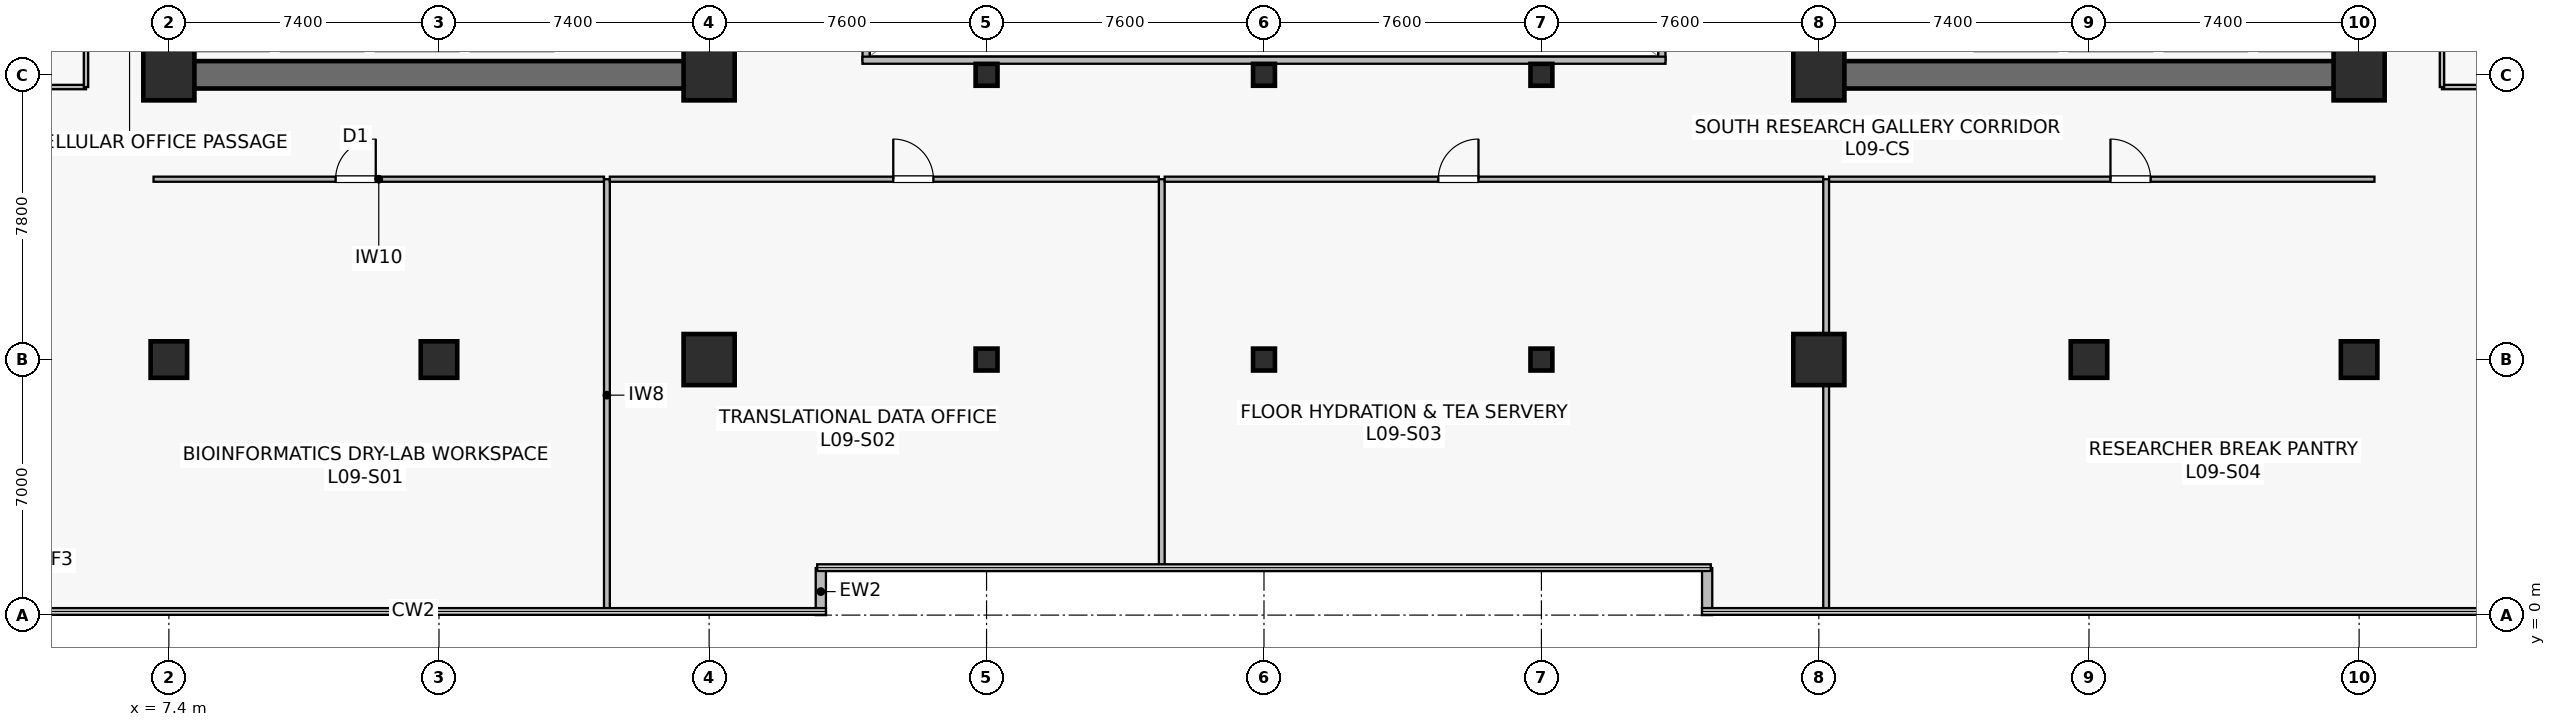
"""IFC4 building model, lengths in metres.
Left out: names, types, materials, properties, quantities, classifications, styles, units other than length and angle.
Written with IfcOpenShell. Run it as: python <this file> out.ifc"""

import sys

from ifc_helpers import new_model, si_unit, direction, frame, frame_2d, origin, origin_2d, place, context, subcontext, project, spatial, rectangle, hollow_rectangle, extrude, source, transform, mapped, element, fill, save


model = new_model("IFC4")
c1 = context("Model", 3, precision=1e-05, world=origin(), true_north=direction((0.0, 1.0)))
c2 = subcontext(c1, "Body", "Model", "MODEL_VIEW")
j1 = project(units=[si_unit("LENGTHUNIT", "METRE"), si_unit("PLANEANGLEUNIT", "RADIAN")], contexts=[c1])
p1 = place(None, origin())
s1 = spatial("IfcSite", under=j1, at=p1, CompositionType="ELEMENT")
p2 = place(p1, origin())
s2 = spatial("IfcBuilding", under=s1, at=p2, CompositionType="ELEMENT")
p3 = place(p2, frame((0.0, 0.0, 37.5)))
s3 = spatial("IfcBuildingStorey", under=s2, at=p3, CompositionType="ELEMENT", Elevation=37.5)
p4 = place(p3, frame((7.025, 14.8, 0.0), z_axis=(0.0, 0.0, 1.0), x_axis=(1.0, 0.0, 0.0)))
e1 = element("IfcWall", 1, at=p4, inside=s3, PredefinedType="SHEAR", context=c2, shape_type="SweptSolid", body=[
    extrude(rectangle(XDim=15.55, YDim=0.75, at=frame_2d((7.775, 0.0))), origin(), (0.0, 0.0, 1.0), 3.78),
])
p5 = place(p3, frame((7.4, 15.175, 0.0), z_axis=(0.0, 0.0, 1.0), x_axis=(0.0, 1.0, 0.0)))
e2 = element("IfcWall", 2, at=p5, inside=s3, PredefinedType="SHEAR", context=c2, shape_type="SweptSolid", body=[
    extrude(rectangle(XDim=18.25, YDim=0.75, at=frame_2d((9.125, 0.0))), origin(), (0.0, 0.0, 1.0), 3.78),
])
p6 = place(p3, frame((22.2, 15.175, 0.0), z_axis=(0.0, 0.0, 1.0), x_axis=(0.0, 1.0, 0.0)))
e3 = element("IfcWall", 3, at=p6, inside=s3, PredefinedType="SHEAR", context=c2, shape_type="SweptSolid", body=[
    extrude(rectangle(XDim=18.25, YDim=0.75, at=frame_2d((9.125, 0.0))), origin(), (0.0, 0.0, 1.0), 3.78),
])
p7 = place(p6, frame((3.375, 0.0, 0.0)))
e4 = element("IfcOpeningElement", 4, at=p7, cuts=e3, PredefinedType="OPENING", context=c2, shape_type="SweptSolid", body=[
    extrude(rectangle(XDim=1.42, YDim=2.2, at=frame_2d((0.71, 1.1))), frame((0.0, 0.385, 0.0), z_axis=(0.0, -1.0, 0.0), x_axis=(1.0, 0.0, 0.0)), (0.0, 0.0, 1.0), 0.77),
])
p8 = place(p3, frame((52.225, 14.8, 0.0), z_axis=(0.0, 0.0, 1.0), x_axis=(1.0, 0.0, 0.0)))
e5 = element("IfcWall", 5, at=p8, inside=s3, PredefinedType="SHEAR", context=c2, shape_type="SweptSolid", body=[
    extrude(rectangle(XDim=15.55, YDim=0.75, at=frame_2d((7.775, 0.0))), origin(), (0.0, 0.0, 1.0), 3.78),
])
p9 = place(p3, frame((52.6, 15.175, 0.0), z_axis=(0.0, 0.0, 1.0), x_axis=(0.0, 1.0, 0.0)))
e6 = element("IfcWall", 6, at=p9, inside=s3, PredefinedType="SHEAR", context=c2, shape_type="SweptSolid", body=[
    extrude(rectangle(XDim=18.25, YDim=0.75, at=frame_2d((9.125, 0.0))), origin(), (0.0, 0.0, 1.0), 3.78),
])
p10 = place(p9, frame((3.375, 0.0, 0.0)))
e7 = element("IfcOpeningElement", 7, at=p10, cuts=e6, PredefinedType="OPENING", context=c2, shape_type="SweptSolid", body=[
    extrude(rectangle(XDim=1.42, YDim=2.2, at=frame_2d((0.71, 1.1))), frame((0.0, 0.385, 0.0), z_axis=(0.0, -1.0, 0.0), x_axis=(1.0, 0.0, 0.0)), (0.0, 0.0, 1.0), 0.77),
])
p11 = place(p3, frame((67.4, 15.175, 0.0), z_axis=(0.0, 0.0, 1.0), x_axis=(0.0, 1.0, 0.0)))
e8 = element("IfcWall", 8, at=p11, inside=s3, PredefinedType="SHEAR", context=c2, shape_type="SweptSolid", body=[
    extrude(rectangle(XDim=18.25, YDim=0.75, at=frame_2d((9.125, 0.0))), origin(), (0.0, 0.0, 1.0), 3.78),
])
m1 = source(origin(), c2, "Body", "SweptSolid", [
    extrude(rectangle(XDim=1.0, YDim=1.0, at=origin_2d()), origin(), (0.0, 0.0, 1.0), 4.1),
])
p12 = place(p3, frame((14.8, 7.0, 0.0), z_axis=(0.0, 0.0, 1.0), x_axis=(1.0, 0.0, 0.0)))
e9 = element("IfcColumn", 9, at=p12, inside=s3, PredefinedType="COLUMN", context=c2, shape_type="MappedRepresentation", body=[
    mapped(m1, transform((0.0, 0.0, 0.0), scale=1.0)),
])
m2 = source(origin(), c2, "Body", "SweptSolid", [
    extrude(rectangle(XDim=1.4, YDim=1.4, at=origin_2d()), origin(), (0.0, 0.0, 1.0), 4.1),
])
for number, where, z_axis, x_axis in (
    (10, (22.2, 7.0, 0.0), (0.0, 0.0, 1.0), (1.0, 0.0, 0.0)),
    (11, (7.4, 14.8, 0.0), (0.0, 0.0, 1.0), (1.0, 0.0, 0.0)),
    (12, (22.2, 14.8, 0.0), (0.0, 0.0, 1.0), (1.0, 0.0, 0.0)),
    (13, (52.6, 7.0, 0.0), (0.0, 0.0, 1.0), (1.0, 0.0, 0.0)),
):
    element("IfcColumn", number, at=place(p3, frame(where, z_axis=z_axis, x_axis=x_axis)), inside=s3, PredefinedType="COLUMN", context=c2, shape_type="MappedRepresentation", body=[
        mapped(m2, transform((0.0, 0.0, 0.0), scale=1.0)),
    ])
p13 = place(p3, frame((60.0, 7.0, 0.0), z_axis=(0.0, 0.0, 1.0), x_axis=(1.0, 0.0, 0.0)))
e14 = element("IfcColumn", 14, at=p13, inside=s3, PredefinedType="COLUMN", context=c2, shape_type="MappedRepresentation", body=[
    mapped(m1, transform((0.0, 0.0, 0.0), scale=1.0)),
])
for number, where, z_axis, x_axis in (
    (15, (52.6, 14.8, 0.0), (0.0, 0.0, 1.0), (1.0, 0.0, 0.0)),
    (16, (67.4, 14.8, 0.0), (0.0, 0.0, 1.0), (1.0, 0.0, 0.0)),
):
    element("IfcColumn", number, at=place(p3, frame(where, z_axis=z_axis, x_axis=x_axis)), inside=s3, PredefinedType="COLUMN", context=c2, shape_type="MappedRepresentation", body=[
        mapped(m2, transform((0.0, 0.0, 0.0), scale=1.0)),
    ])
for number, where, z_axis, x_axis in (
    (17, (7.4, 7.0, 0.0), (0.0, 0.0, 1.0), (1.0, 0.0, 0.0)),
    (18, (67.4, 7.0, 0.0), (0.0, 0.0, 1.0), (1.0, 0.0, 0.0)),
):
    element("IfcColumn", number, at=place(p3, frame(where, z_axis=z_axis, x_axis=x_axis)), inside=s3, PredefinedType="COLUMN", context=c2, shape_type="MappedRepresentation", body=[
        mapped(m1, transform((0.0, 0.0, 0.0), scale=1.0)),
    ])
m3 = source(origin(), c2, "Body", "SweptSolid", [
    extrude(hollow_rectangle(XDim=0.6, YDim=0.6, WallThickness=0.028, at=origin_2d()), origin(), (0.0, 0.0, 1.0), 4.1),
])
for number, where, z_axis, x_axis in (
    (19, (29.8, 7.0, 0.0), (0.0, 0.0, 1.0), (1.0, 0.0, 0.0)),
    (20, (29.8, 14.8, 0.0), (0.0, 0.0, 1.0), (1.0, 0.0, 0.0)),
    (21, (37.4, 7.0, 0.0), (0.0, 0.0, 1.0), (1.0, 0.0, 0.0)),
    (22, (37.4, 14.8, 0.0), (0.0, 0.0, 1.0), (1.0, 0.0, 0.0)),
    (23, (45.0, 7.0, 0.0), (0.0, 0.0, 1.0), (1.0, 0.0, 0.0)),
    (24, (45.0, 14.8, 0.0), (0.0, 0.0, 1.0), (1.0, 0.0, 0.0)),
):
    element("IfcColumn", number, at=place(p3, frame(where, z_axis=z_axis, x_axis=x_axis)), inside=s3, PredefinedType="COLUMN", context=c2, shape_type="MappedRepresentation", body=[
        mapped(m3, transform((0.0, 0.0, 0.0), scale=1.0)),
    ])
for number, where, z_axis, x_axis in (
    (25, (25.26, 0.0, 0.0), (0.0, 0.0, 1.0), (0.0, 1.0, 0.0)),
    (26, (49.54, 1.288, 0.0), (0.0, 0.0, 1.0), (0.0, -1.0, 0.0)),
):
    element("IfcWall", number, at=place(p3, frame(where, z_axis=z_axis, x_axis=x_axis)), inside=s3, PredefinedType="STANDARD", context=c2, shape_type="SweptSolid", body=[
        extrude(rectangle(XDim=1.288, YDim=0.28, at=frame_2d((0.644, 0.0))), origin(), (0.0, 0.0, 1.0), 3.78),
    ])
p14 = place(p3, frame((26.5, 15.2, 0.0), z_axis=(0.0, 0.0, 1.0), x_axis=(0.0, 1.0, 0.0)))
e27 = element("IfcWall", 27, at=p14, inside=s3, PredefinedType="SOLIDWALL", context=c2, shape_type="SweptSolid", body=[
    extrude(rectangle(XDim=18.2, YDim=0.195, at=frame_2d((9.1, 0.0))), origin(), (0.0, 0.0, 1.0), 3.78),
])
p15 = place(p14, frame((1.8, 0.0, 0.9)))
e28 = element("IfcOpeningElement", 28, at=p15, cuts=e27, PredefinedType="OPENING", context=c2, shape_type="SweptSolid", body=[
    extrude(rectangle(XDim=1.2, YDim=1.35, at=frame_2d((0.6, 0.675))), frame((0.0, 0.107, 0.0), z_axis=(0.0, -1.0, 0.0), x_axis=(1.0, 0.0, 0.0)), (0.0, 0.0, 1.0), 0.215),
])
p16 = place(p14, frame((13.2, 0.0, 0.9)))
e29 = element("IfcOpeningElement", 29, at=p16, cuts=e27, PredefinedType="OPENING", context=c2, shape_type="SweptSolid", body=[
    extrude(rectangle(XDim=1.2, YDim=1.35, at=frame_2d((0.6, 0.675))), frame((0.0, 0.107, 0.0), z_axis=(0.0, -1.0, 0.0), x_axis=(1.0, 0.0, 0.0)), (0.0, 0.0, 1.0), 0.215),
])
p17 = place(p3, frame((48.3, 15.2, 0.0), z_axis=(0.0, 0.0, 1.0), x_axis=(0.0, 1.0, 0.0)))
e30 = element("IfcWall", 30, at=p17, inside=s3, PredefinedType="SOLIDWALL", context=c2, shape_type="SweptSolid", body=[
    extrude(rectangle(XDim=18.2, YDim=0.195, at=frame_2d((9.1, 0.0))), origin(), (0.0, 0.0, 1.0), 3.78),
])
p18 = place(p17, frame((1.8, 0.0, 0.9)))
e31 = element("IfcOpeningElement", 31, at=p18, cuts=e30, PredefinedType="OPENING", context=c2, shape_type="SweptSolid", body=[
    extrude(rectangle(XDim=1.2, YDim=1.35, at=frame_2d((0.6, 0.675))), frame((0.0, 0.107, 0.0), z_axis=(0.0, -1.0, 0.0), x_axis=(1.0, 0.0, 0.0)), (0.0, 0.0, 1.0), 0.215),
])
p19 = place(p17, frame((13.2, 0.0, 0.9)))
e32 = element("IfcOpeningElement", 32, at=p19, cuts=e30, PredefinedType="OPENING", context=c2, shape_type="SweptSolid", body=[
    extrude(rectangle(XDim=1.2, YDim=1.35, at=frame_2d((0.6, 0.675))), frame((0.0, 0.107, 0.0), z_axis=(0.0, -1.0, 0.0), x_axis=(1.0, 0.0, 0.0)), (0.0, 0.0, 1.0), 0.215),
])
p20 = place(p3, frame((26.4, 15.2, 0.0), z_axis=(0.0, 0.0, 1.0), x_axis=(1.0, 0.0, 0.0)))
e33 = element("IfcWall", 33, at=p20, inside=s3, PredefinedType="SOLIDWALL", context=c2, shape_type="SweptSolid", body=[
    extrude(rectangle(XDim=22.0, YDim=0.195, at=frame_2d((11.0, 0.0))), origin(), (0.0, 0.0, 1.0), 3.78),
])
p21 = place(p3, frame((6.98, 11.94, 0.0), z_axis=(0.0, 0.0, 1.0), x_axis=(1.0, 0.0, 0.0)))
e34 = element("IfcWall", 34, at=p21, inside=s3, PredefinedType="PARTITIONING", context=c2, shape_type="SweptSolid", body=[
    extrude(rectangle(XDim=12.34, YDim=0.14, at=frame_2d((6.17, 0.0))), origin(), (0.0, 0.0, 1.0), 3.065),
])
p22 = place(p21, frame((4.988, 0.0, 0.0)))
e35 = element("IfcOpeningElement", 35, at=p22, cuts=e34, PredefinedType="OPENING", context=c2, shape_type="SweptSolid", body=[
    extrude(rectangle(XDim=1.1, YDim=2.18, at=frame_2d((0.55, 1.09))), frame((0.0, 0.08, 0.0), z_axis=(0.0, -1.0, 0.0), x_axis=(1.0, 0.0, 0.0)), (0.0, 0.0, 1.0), 0.16),
])
p23 = place(p3, frame((19.4, 0.11, 0.0), z_axis=(0.0, 0.0, 1.0), x_axis=(0.0, 1.0, 0.0)))
e36 = element("IfcWall", 36, at=p23, inside=s3, PredefinedType="PARTITIONING", context=c2, shape_type="SweptSolid", body=[
    extrude(rectangle(XDim=11.83, YDim=0.16, at=frame_2d((5.915, 0.0))), origin(), (0.0, 0.0, 1.0), 3.015),
])
p24 = place(p3, frame((19.48, 11.94, 0.0), z_axis=(0.0, 0.0, 1.0), x_axis=(1.0, 0.0, 0.0)))
e37 = element("IfcWall", 37, at=p24, inside=s3, PredefinedType="PARTITIONING", context=c2, shape_type="SweptSolid", body=[
    extrude(rectangle(XDim=15.04, YDim=0.14, at=frame_2d((7.52, 0.0))), origin(), (0.0, 0.0, 1.0), 3.065),
])
p25 = place(p24, frame((7.764, 0.0, 0.0)))
e38 = element("IfcOpeningElement", 38, at=p25, cuts=e37, PredefinedType="OPENING", context=c2, shape_type="SweptSolid", body=[
    extrude(rectangle(XDim=1.1, YDim=2.18, at=frame_2d((0.55, 1.09))), frame((0.0, 0.08, 0.0), z_axis=(0.0, -1.0, 0.0), x_axis=(1.0, 0.0, 0.0)), (0.0, 0.0, 1.0), 0.16),
])
p26 = place(p3, frame((34.6, 1.31, 0.0), z_axis=(0.0, 0.0, 1.0), x_axis=(0.0, 1.0, 0.0)))
e39 = element("IfcWall", 39, at=p26, inside=s3, PredefinedType="PARTITIONING", context=c2, shape_type="SweptSolid", body=[
    extrude(rectangle(XDim=10.63, YDim=0.16, at=frame_2d((5.315, 0.0))), origin(), (0.0, 0.0, 1.0), 3.015),
])
p27 = place(p3, frame((34.68, 11.94, 0.0), z_axis=(0.0, 0.0, 1.0), x_axis=(1.0, 0.0, 0.0)))
e40 = element("IfcWall", 40, at=p27, inside=s3, PredefinedType="PARTITIONING", context=c2, shape_type="SweptSolid", body=[
    extrude(rectangle(XDim=18.04, YDim=0.14, at=frame_2d((9.02, 0.0))), origin(), (0.0, 0.0, 1.0), 3.065),
])
p28 = place(p27, frame((7.496, 0.0, 0.0)))
e41 = element("IfcOpeningElement", 41, at=p28, cuts=e40, PredefinedType="OPENING", context=c2, shape_type="SweptSolid", body=[
    extrude(rectangle(XDim=1.1, YDim=2.18, at=frame_2d((0.55, 1.09))), frame((0.0, 0.08, 0.0), z_axis=(0.0, -1.0, 0.0), x_axis=(1.0, 0.0, 0.0)), (0.0, 0.0, 1.0), 0.16),
])
p29 = place(p3, frame((52.8, 0.11, 0.0), z_axis=(0.0, 0.0, 1.0), x_axis=(0.0, 1.0, 0.0)))
e42 = element("IfcWall", 42, at=p29, inside=s3, PredefinedType="PARTITIONING", context=c2, shape_type="SweptSolid", body=[
    extrude(rectangle(XDim=11.83, YDim=0.16, at=frame_2d((5.915, 0.0))), origin(), (0.0, 0.0, 1.0), 3.015),
])
p30 = place(p3, frame((52.88, 11.94, 0.0), z_axis=(0.0, 0.0, 1.0), x_axis=(1.0, 0.0, 0.0)))
e43 = element("IfcWall", 43, at=p30, inside=s3, PredefinedType="PARTITIONING", context=c2, shape_type="SweptSolid", body=[
    extrude(rectangle(XDim=14.94, YDim=0.14, at=frame_2d((7.47, 0.0))), origin(), (0.0, 0.0, 1.0), 3.065),
])
p31 = place(p30, frame((7.708, 0.0, 0.0)))
e44 = element("IfcOpeningElement", 44, at=p31, cuts=e43, PredefinedType="OPENING", context=c2, shape_type="SweptSolid", body=[
    extrude(rectangle(XDim=1.1, YDim=2.18, at=frame_2d((0.55, 1.09))), frame((0.0, 0.08, 0.0), z_axis=(0.0, -1.0, 0.0), x_axis=(1.0, 0.0, 0.0)), (0.0, 0.0, 1.0), 0.16),
])
p32 = place(p3, frame((0.11, 14.465, 0.0), z_axis=(0.0, 0.0, 1.0), x_axis=(1.0, 0.0, 0.0)))
e45 = element("IfcWall", 45, at=p32, inside=s3, PredefinedType="PARTITIONING", context=c2, shape_type="SweptSolid", body=[
    extrude(rectangle(XDim=5.02, YDim=0.12, at=frame_2d((2.51, 0.0))), origin(), (0.0, 0.0, 1.0), 3.78),
])
p33 = place(p3, frame((5.13, 14.465, 0.0), z_axis=(0.0, 0.0, 1.0), x_axis=(0.0, 1.0, 0.0)))
e46 = element("IfcWall", 46, at=p33, inside=s3, PredefinedType="PARTITIONING", context=c2, shape_type="SweptSolid", body=[
    extrude(rectangle(XDim=5.275, YDim=0.12, at=frame_2d((2.637, 0.0))), origin(), (0.0, 0.0, 1.0), 3.78),
])
p34 = place(p33, frame((2.188, 0.0, 0.0)))
e47 = element("IfcOpeningElement", 47, at=p34, cuts=e46, PredefinedType="OPENING", context=c2, shape_type="SweptSolid", body=[
    extrude(rectangle(XDim=0.9, YDim=2.1, at=frame_2d((0.45, 1.05))), frame((0.0, 0.07, 0.0), z_axis=(0.0, -1.0, 0.0), x_axis=(1.0, 0.0, 0.0)), (0.0, 0.0, 1.0), 0.14),
])
p35 = place(p3, frame((69.67, 14.465, 0.0), z_axis=(0.0, 0.0, 1.0), x_axis=(1.0, 0.0, 0.0)))
e48 = element("IfcWall", 48, at=p35, inside=s3, PredefinedType="PARTITIONING", context=c2, shape_type="SweptSolid", body=[
    extrude(rectangle(XDim=5.02, YDim=0.12, at=frame_2d((2.51, 0.0))), origin(), (0.0, 0.0, 1.0), 3.78),
])
p36 = place(p3, frame((69.67, 14.465, 0.0), z_axis=(0.0, 0.0, 1.0), x_axis=(0.0, 1.0, 0.0)))
e49 = element("IfcWall", 49, at=p36, inside=s3, PredefinedType="PARTITIONING", context=c2, shape_type="SweptSolid", body=[
    extrude(rectangle(XDim=8.675, YDim=0.12, at=frame_2d((4.337, 0.0))), origin(), (0.0, 0.0, 1.0), 3.78),
])
p37 = place(p36, frame((3.887, 0.0, 0.0)))
e50 = element("IfcOpeningElement", 50, at=p37, cuts=e49, PredefinedType="OPENING", context=c2, shape_type="SweptSolid", body=[
    extrude(rectangle(XDim=0.9, YDim=2.1, at=frame_2d((0.45, 1.05))), frame((0.0, 0.07, 0.0), z_axis=(0.0, -1.0, 0.0), x_axis=(1.0, 0.0, 0.0)), (0.0, 0.0, 1.0), 0.14),
])
m4 = source(origin(), c2, "Body", "SweptSolid", [
    extrude(rectangle(XDim=1.1, YDim=2.18, at=frame_2d((0.55, 1.09))), frame((0.0, 0.025, 0.0), z_axis=(0.0, -1.0, 0.0), x_axis=(1.0, 0.0, 0.0)), (0.0, 0.0, 1.0), 0.05),
])
p38 = place(p22, origin())
e51 = element("IfcDoor", 51, at=p38, inside=s3, OperationType="SINGLE_SWING_RIGHT", PredefinedType="DOOR", context=c2, shape_type="MappedRepresentation", body=[
    mapped(m4, transform((0.0, 0.0, 0.0), scale=1.0)),
])
fill(e35, e51)
p39 = place(p25, origin())
e52 = element("IfcDoor", 52, at=p39, inside=s3, OperationType="SINGLE_SWING_LEFT", PredefinedType="DOOR", context=c2, shape_type="MappedRepresentation", body=[
    mapped(m4, transform((0.0, 0.0, 0.0), scale=1.0)),
])
fill(e38, e52)
p40 = place(p28, origin())
e53 = element("IfcDoor", 53, at=p40, inside=s3, OperationType="SINGLE_SWING_RIGHT", PredefinedType="DOOR", context=c2, shape_type="MappedRepresentation", body=[
    mapped(m4, transform((0.0, 0.0, 0.0), scale=1.0)),
])
fill(e41, e53)
p41 = place(p31, origin())
e54 = element("IfcDoor", 54, at=p41, inside=s3, OperationType="SINGLE_SWING_LEFT", PredefinedType="DOOR", context=c2, shape_type="MappedRepresentation", body=[
    mapped(m4, transform((0.0, 0.0, 0.0), scale=1.0)),
])
fill(e44, e54)
save(model, sys.argv[1])
